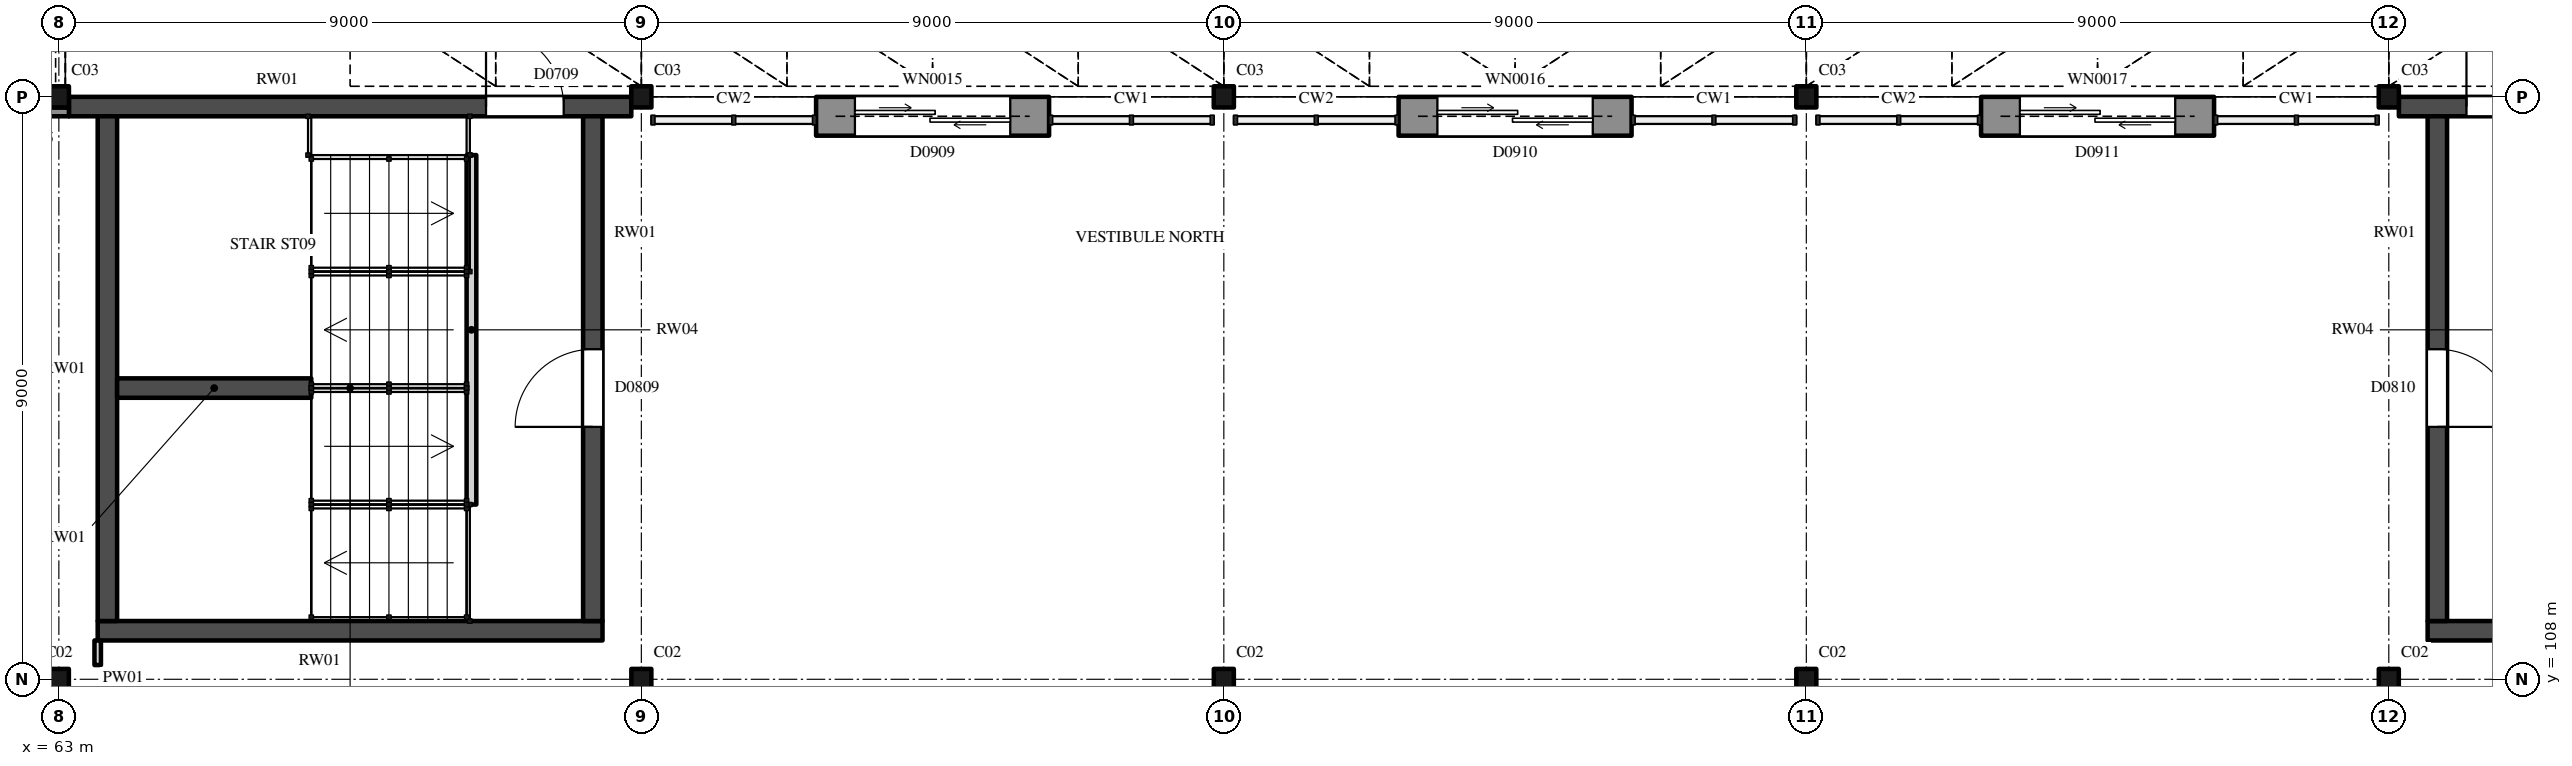
"""IFC4 building model, lengths in metres.
Left out: names, types, materials, properties, quantities, classifications, styles, units other than length and angle.
Written with IfcOpenShell. Run it as: python <this file> out.ifc"""

import sys

from ifc_helpers import new_model, si_unit, direction, frame, frame_2d, origin, origin_2d, place, context, subcontext, project, spatial, rectangle, i_section, extrude, element, fill, save


model = new_model("IFC4")
c1 = context("Model", 3, precision=1e-05, world=origin(), true_north=direction((0.0, 1.0)))
c2 = subcontext(c1, "Body", "Model", "MODEL_VIEW")
j1 = project(units=[si_unit("LENGTHUNIT", "METRE"), si_unit("PLANEANGLEUNIT", "RADIAN")], contexts=[c1])
p1 = place(None, origin())
s1 = spatial("IfcSite", under=j1, at=p1, CompositionType="ELEMENT")
p2 = place(p1, origin())
s2 = spatial("IfcBuilding", under=s1, at=p2, CompositionType="ELEMENT")
p3 = place(p2, origin())
s3 = spatial("IfcBuildingStorey", under=s2, at=p3, CompositionType="ELEMENT", Elevation=0.0)
for number, where, z_axis, x_axis in (
    (1, (63.0, 108.0, 0.0), (0.0, 0.0, 1.0), (1.0, 0.0, 0.0)),
    (2, (72.0, 108.0, 0.0), (0.0, 0.0, 1.0), (1.0, 0.0, 0.0)),
    (3, (81.0, 108.0, 0.0), (0.0, 0.0, 1.0), (1.0, 0.0, 0.0)),
    (4, (90.0, 108.0, 0.0), (0.0, 0.0, 1.0), (1.0, 0.0, 0.0)),
    (5, (99.0, 108.0, 0.0), (0.0, 0.0, 1.0), (1.0, 0.0, 0.0)),
):
    element("IfcColumn", number, at=place(p3, frame(where, z_axis=z_axis, x_axis=x_axis)), inside=s3, PredefinedType="COLUMN", context=c2, shape_type="SweptSolid", body=[
        extrude(i_section(OverallWidth=0.309, OverallDepth=0.321, WebThickness=0.014, FlangeThickness=0.022, FilletRadius=0.017, at=origin_2d()), origin(), (0.0, 0.0, 1.0), 6.0),
    ])
for number, where, z_axis, x_axis in (
    (6, (63.0, 117.0, 0.0), (0.0, 0.0, 1.0), (1.0, 0.0, 0.0)),
    (7, (72.0, 117.0, 0.0), (0.0, 0.0, 1.0), (1.0, 0.0, 0.0)),
    (8, (81.0, 117.0, 0.0), (0.0, 0.0, 1.0), (1.0, 0.0, 0.0)),
    (9, (90.0, 117.0, 0.0), (0.0, 0.0, 1.0), (1.0, 0.0, 0.0)),
    (10, (99.0, 117.0, 0.0), (0.0, 0.0, 1.0), (1.0, 0.0, 0.0)),
):
    element("IfcColumn", number, at=place(p3, frame(where, z_axis=z_axis, x_axis=x_axis)), inside=s3, PredefinedType="COLUMN", context=c2, shape_type="SweptSolid", body=[
        extrude(i_section(OverallWidth=0.311, OverallDepth=0.327, WebThickness=0.016, FlangeThickness=0.025, FilletRadius=0.017, at=origin_2d()), origin(), (0.0, 0.0, 1.0), 6.0),
    ])
p4 = place(p3, frame((63.025, 117.0, 5.0), z_axis=(0.0, 0.0, 1.0), x_axis=(0.0, 1.0, 0.0)))
e11 = element("IfcWall", 11, at=p4, inside=s3, PredefinedType="PARAPET", context=c2, shape_type="SweptSolid", body=[
    extrude(rectangle(XDim=4.35, YDim=0.15, at=frame_2d((2.175, 0.0))), origin(), (0.0, 0.0, 1.0), 0.3),
])
p5 = place(p3, frame((63.6, 108.75, 0.0), z_axis=(0.0, 0.0, 1.0), x_axis=(1.0, 0.0, 0.0)))
e12 = element("IfcWall", 12, at=p5, inside=s3, PredefinedType="SHEAR", context=c2, shape_type="SweptSolid", body=[
    extrude(rectangle(XDim=7.8, YDim=0.3, at=frame_2d((3.9, 0.0))), origin(), (0.0, 0.0, 1.0), 6.0),
])
p6 = place(p3, frame((63.156, 116.85, 0.0), z_axis=(0.0, 0.0, 1.0), x_axis=(1.0, 0.0, 0.0)))
e13 = element("IfcWall", 13, at=p6, inside=s3, PredefinedType="SHEAR", context=c2, shape_type="SweptSolid", body=[
    extrude(rectangle(XDim=8.689, YDim=0.3, at=frame_2d((4.344, 0.0))), origin(), (0.0, 0.0, 1.0), 6.0),
])
p7 = place(p6, frame((6.445, 0.0, 0.0)))
e14 = element("IfcOpeningElement", 14, at=p7, cuts=e13, PredefinedType="OPENING", context=c2, shape_type="SweptSolid", body=[
    extrude(rectangle(XDim=1.2, YDim=2.1, at=frame_2d((0.6, 1.05))), frame((0.0, 0.16, 0.0), z_axis=(0.0, -1.0, 0.0), x_axis=(1.0, 0.0, 0.0)), (0.0, 0.0, 1.0), 0.32),
])
p8 = place(p3, frame((63.75, 108.9, 0.0), z_axis=(0.0, 0.0, 1.0), x_axis=(0.0, 1.0, 0.0)))
e15 = element("IfcWall", 15, at=p8, inside=s3, PredefinedType="SHEAR", context=c2, shape_type="SweptSolid", body=[
    extrude(rectangle(XDim=7.8, YDim=0.3, at=frame_2d((3.9, 0.0))), origin(), (0.0, 0.0, 1.0), 6.0),
])
p9 = place(p3, frame((71.25, 108.9, 0.0), z_axis=(0.0, 0.0, 1.0), x_axis=(0.0, 1.0, 0.0)))
e16 = element("IfcWall", 16, at=p9, inside=s3, PredefinedType="SHEAR", context=c2, shape_type="SweptSolid", body=[
    extrude(rectangle(XDim=7.8, YDim=0.3, at=frame_2d((3.9, 0.0))), origin(), (0.0, 0.0, 1.0), 6.0),
])
p10 = place(p9, frame((3.0, 0.0, 0.0)))
e17 = element("IfcOpeningElement", 17, at=p10, cuts=e16, PredefinedType="OPENING", context=c2, shape_type="SweptSolid", body=[
    extrude(rectangle(XDim=1.2, YDim=2.1, at=frame_2d((0.6, 1.05))), frame((0.0, 0.16, 0.0), z_axis=(0.0, -1.0, 0.0), x_axis=(1.0, 0.0, 0.0)), (0.0, 0.0, 1.0), 0.32),
])
p11 = place(p3, frame((99.6, 108.75, 0.0), z_axis=(0.0, 0.0, 1.0), x_axis=(1.0, 0.0, 0.0)))
e18 = element("IfcWall", 18, at=p11, inside=s3, PredefinedType="SHEAR", context=c2, shape_type="SweptSolid", body=[
    extrude(rectangle(XDim=7.8, YDim=0.3, at=frame_2d((3.9, 0.0))), origin(), (0.0, 0.0, 1.0), 6.0),
])
p12 = place(p3, frame((99.156, 116.85, 0.0), z_axis=(0.0, 0.0, 1.0), x_axis=(1.0, 0.0, 0.0)))
e19 = element("IfcWall", 19, at=p12, inside=s3, PredefinedType="SHEAR", context=c2, shape_type="SweptSolid", body=[
    extrude(rectangle(XDim=8.689, YDim=0.3, at=frame_2d((4.344, 0.0))), origin(), (0.0, 0.0, 1.0), 6.0),
])
p13 = place(p12, frame((1.044, 0.0, 0.0)))
e20 = element("IfcOpeningElement", 20, at=p13, cuts=e19, PredefinedType="OPENING", context=c2, shape_type="SweptSolid", body=[
    extrude(rectangle(XDim=1.2, YDim=2.1, at=frame_2d((0.6, 1.05))), frame((0.0, 0.16, 0.0), z_axis=(0.0, -1.0, 0.0), x_axis=(1.0, 0.0, 0.0)), (0.0, 0.0, 1.0), 0.32),
])
p14 = place(p3, frame((99.75, 108.9, 0.0), z_axis=(0.0, 0.0, 1.0), x_axis=(0.0, 1.0, 0.0)))
e21 = element("IfcWall", 21, at=p14, inside=s3, PredefinedType="SHEAR", context=c2, shape_type="SweptSolid", body=[
    extrude(rectangle(XDim=7.8, YDim=0.3, at=frame_2d((3.9, 0.0))), origin(), (0.0, 0.0, 1.0), 6.0),
])
p15 = place(p14, frame((3.0, 0.0, 0.0)))
e22 = element("IfcOpeningElement", 22, at=p15, cuts=e21, PredefinedType="OPENING", context=c2, shape_type="SweptSolid", body=[
    extrude(rectangle(XDim=1.2, YDim=2.1, at=frame_2d((0.6, 1.05))), frame((0.0, 0.16, 0.0), z_axis=(0.0, -1.0, 0.0), x_axis=(1.0, 0.0, 0.0)), (0.0, 0.0, 1.0), 0.32),
])
p16 = place(p3, frame((66.9, 112.5, 0.0), z_axis=(0.0, 0.0, 1.0), x_axis=(-1.0, 0.0, 0.0)))
e23 = element("IfcWall", 23, at=p16, inside=s3, PredefinedType="SHEAR", context=c2, shape_type="SweptSolid", body=[
    extrude(rectangle(XDim=3.0, YDim=0.3, at=frame_2d((1.5, 0.0))), origin(), (0.0, 0.0, 1.0), 6.0),
])
p17 = place(p3, frame((69.375, 110.7, 0.0), z_axis=(0.0, 0.0, 1.0), x_axis=(0.0, 1.0, 0.0)))
e24 = element("IfcWall", 24, at=p17, inside=s3, PredefinedType="STANDARD", context=c2, shape_type="SweptSolid", body=[
    extrude(rectangle(XDim=5.4, YDim=0.15, at=frame_2d((2.7, 0.0))), origin(), (0.0, 0.0, 1.0), 2.8),
])
p18 = place(p3, frame((74.7, 116.7, 0.0), z_axis=(0.0, 0.0, 1.0), x_axis=(1.0, 0.0, 0.0)))
e25 = element("IfcWall", 25, at=p18, inside=s3, PredefinedType="SOLIDWALL", context=c2, shape_type="SweptSolid", body=[
    extrude(rectangle(XDim=3.6, YDim=0.6, at=frame_2d((1.8, 0.0))), origin(), (0.0, 0.0, 1.0), 5.466),
])
p19 = place(p18, frame((0.6, 0.0, 0.0)))
e26 = element("IfcOpeningElement", 26, at=p19, cuts=e25, PredefinedType="OPENING", context=c2, shape_type="SweptSolid", body=[
    extrude(rectangle(XDim=2.4, YDim=2.5, at=frame_2d((1.2, 1.25))), frame((0.0, 0.31, 0.0), z_axis=(0.0, -1.0, 0.0), x_axis=(1.0, 0.0, 0.0)), (0.0, 0.0, 1.0), 0.62),
])
p20 = place(p18, frame((0.3, 0.0, 3.0)))
e27 = element("IfcOpeningElement", 27, at=p20, cuts=e25, PredefinedType="OPENING", context=c2, shape_type="SweptSolid", body=[
    extrude(rectangle(XDim=3.0, YDim=2.4, at=frame_2d((1.5, 1.2))), frame((0.0, 0.31, 0.0), z_axis=(0.0, -1.0, 0.0), x_axis=(1.0, 0.0, 0.0)), (0.0, 0.0, 1.0), 0.62),
])
p21 = place(p3, frame((83.7, 116.7, 0.0), z_axis=(0.0, 0.0, 1.0), x_axis=(1.0, 0.0, 0.0)))
e28 = element("IfcWall", 28, at=p21, inside=s3, PredefinedType="SOLIDWALL", context=c2, shape_type="SweptSolid", body=[
    extrude(rectangle(XDim=3.6, YDim=0.6, at=frame_2d((1.8, 0.0))), origin(), (0.0, 0.0, 1.0), 5.466),
])
p22 = place(p21, frame((0.6, 0.0, 0.0)))
e29 = element("IfcOpeningElement", 29, at=p22, cuts=e28, PredefinedType="OPENING", context=c2, shape_type="SweptSolid", body=[
    extrude(rectangle(XDim=2.4, YDim=2.5, at=frame_2d((1.2, 1.25))), frame((0.0, 0.31, 0.0), z_axis=(0.0, -1.0, 0.0), x_axis=(1.0, 0.0, 0.0)), (0.0, 0.0, 1.0), 0.62),
])
p23 = place(p21, frame((0.3, 0.0, 3.0)))
e30 = element("IfcOpeningElement", 30, at=p23, cuts=e28, PredefinedType="OPENING", context=c2, shape_type="SweptSolid", body=[
    extrude(rectangle(XDim=3.0, YDim=2.4, at=frame_2d((1.5, 1.2))), frame((0.0, 0.31, 0.0), z_axis=(0.0, -1.0, 0.0), x_axis=(1.0, 0.0, 0.0)), (0.0, 0.0, 1.0), 0.62),
])
p24 = place(p3, frame((92.7, 116.7, 0.0), z_axis=(0.0, 0.0, 1.0), x_axis=(1.0, 0.0, 0.0)))
e31 = element("IfcWall", 31, at=p24, inside=s3, PredefinedType="SOLIDWALL", context=c2, shape_type="SweptSolid", body=[
    extrude(rectangle(XDim=3.6, YDim=0.6, at=frame_2d((1.8, 0.0))), origin(), (0.0, 0.0, 1.0), 5.466),
])
p25 = place(p24, frame((0.6, 0.0, 0.0)))
e32 = element("IfcOpeningElement", 32, at=p25, cuts=e31, PredefinedType="OPENING", context=c2, shape_type="SweptSolid", body=[
    extrude(rectangle(XDim=2.4, YDim=2.5, at=frame_2d((1.2, 1.25))), frame((0.0, 0.31, 0.0), z_axis=(0.0, -1.0, 0.0), x_axis=(1.0, 0.0, 0.0)), (0.0, 0.0, 1.0), 0.62),
])
p26 = place(p24, frame((0.3, 0.0, 3.0)))
e33 = element("IfcOpeningElement", 33, at=p26, cuts=e31, PredefinedType="OPENING", context=c2, shape_type="SweptSolid", body=[
    extrude(rectangle(XDim=3.0, YDim=2.4, at=frame_2d((1.5, 1.2))), frame((0.0, 0.31, 0.0), z_axis=(0.0, -1.0, 0.0), x_axis=(1.0, 0.0, 0.0)), (0.0, 0.0, 1.0), 0.62),
])
p27 = place(p3, frame((62.833, 116.768, 0.0), z_axis=(0.0, 0.0, 1.0), x_axis=(1.0, 0.0, 0.0)))
e34 = element("IfcWall", 34, at=p27, inside=s3, PredefinedType="SOLIDWALL", context=c2, shape_type="SweptSolid", body=[
    extrude(rectangle(XDim=0.322, YDim=0.136, at=frame_2d((0.161, 0.0))), origin(), (0.0, 0.0, 1.0), 6.0),
])
p28 = place(p3, frame((63.6, 108.22, 0.0), z_axis=(0.0, 0.0, 1.0), x_axis=(0.0, 1.0, 0.0)))
e35 = element("IfcWall", 35, at=p28, inside=s3, PredefinedType="PARTITIONING", context=c2, shape_type="SweptSolid", body=[
    extrude(rectangle(XDim=0.38, YDim=0.1, at=frame_2d((0.19, 0.0))), origin(), (0.0, 0.0, 1.0), 5.825),
])
p29 = place(p10, origin())
e36 = element("IfcDoor", 36, at=p29, inside=s3, OperationType="SINGLE_SWING_RIGHT", PredefinedType="DOOR", context=c2, shape_type="SweptSolid", body=[
    extrude(rectangle(XDim=1.2, YDim=2.1, at=frame_2d((0.6, 1.05))), frame((0.0, 0.025, 0.0), z_axis=(0.0, -1.0, 0.0), x_axis=(1.0, 0.0, 0.0)), (0.0, 0.0, 1.0), 0.05),
])
fill(e17, e36)
p30 = place(p7, origin())
e37 = element("IfcDoor", 37, at=p30, inside=s3, OperationType="SINGLE_SWING_RIGHT", PredefinedType="DOOR", context=c2, shape_type="SweptSolid", body=[
    extrude(rectangle(XDim=1.2, YDim=2.1, at=frame_2d((0.6, 1.05))), frame((0.0, 0.025, 0.0), z_axis=(0.0, -1.0, 0.0), x_axis=(1.0, 0.0, 0.0)), (0.0, 0.0, 1.0), 0.05),
])
fill(e14, e37)
p31 = place(p15, origin())
e38 = element("IfcDoor", 38, at=p31, inside=s3, OperationType="SINGLE_SWING_LEFT", PredefinedType="DOOR", context=c2, shape_type="SweptSolid", body=[
    extrude(rectangle(XDim=1.2, YDim=2.1, at=frame_2d((0.6, 1.05))), frame((0.0, 0.025, 0.0), z_axis=(0.0, -1.0, 0.0), x_axis=(1.0, 0.0, 0.0)), (0.0, 0.0, 1.0), 0.05),
])
fill(e22, e38)
p32 = place(p13, origin())
e39 = element("IfcDoor", 39, at=p32, inside=s3, OperationType="SINGLE_SWING_RIGHT", PredefinedType="DOOR", context=c2, shape_type="SweptSolid", body=[
    extrude(rectangle(XDim=1.2, YDim=2.1, at=frame_2d((0.6, 1.05))), frame((0.0, 0.025, 0.0), z_axis=(0.0, -1.0, 0.0), x_axis=(1.0, 0.0, 0.0)), (0.0, 0.0, 1.0), 0.05),
])
fill(e20, e39)
p33 = place(p19, origin())
e40 = element("IfcDoor", 40, at=p33, inside=s3, OperationType="DOUBLE_DOOR_SLIDING", PredefinedType="DOOR", context=c2, shape_type="SweptSolid", body=[
    extrude(rectangle(XDim=2.4, YDim=2.5, at=frame_2d((1.2, 1.25))), frame((0.0, 0.025, 0.0), z_axis=(0.0, -1.0, 0.0), x_axis=(1.0, 0.0, 0.0)), (0.0, 0.0, 1.0), 0.05),
])
fill(e26, e40)
p34 = place(p20, origin())
e41 = element("IfcWindow", 41, at=p34, inside=s3, PartitioningType="SINGLE_PANEL", PredefinedType="WINDOW", context=c2, shape_type="SweptSolid", body=[
    extrude(rectangle(XDim=3.0, YDim=2.4, at=frame_2d((1.5, 1.2))), frame((0.0, 0.03, 0.0), z_axis=(0.0, -1.0, 0.0), x_axis=(1.0, 0.0, 0.0)), (0.0, 0.0, 1.0), 0.06),
])
fill(e27, e41)
p35 = place(p22, origin())
e42 = element("IfcDoor", 42, at=p35, inside=s3, OperationType="DOUBLE_DOOR_SLIDING", PredefinedType="DOOR", context=c2, shape_type="SweptSolid", body=[
    extrude(rectangle(XDim=2.4, YDim=2.5, at=frame_2d((1.2, 1.25))), frame((0.0, 0.025, 0.0), z_axis=(0.0, -1.0, 0.0), x_axis=(1.0, 0.0, 0.0)), (0.0, 0.0, 1.0), 0.05),
])
fill(e29, e42)
p36 = place(p23, origin())
e43 = element("IfcWindow", 43, at=p36, inside=s3, PartitioningType="SINGLE_PANEL", PredefinedType="WINDOW", context=c2, shape_type="SweptSolid", body=[
    extrude(rectangle(XDim=3.0, YDim=2.4, at=frame_2d((1.5, 1.2))), frame((0.0, 0.03, 0.0), z_axis=(0.0, -1.0, 0.0), x_axis=(1.0, 0.0, 0.0)), (0.0, 0.0, 1.0), 0.06),
])
fill(e30, e43)
p37 = place(p25, origin())
e44 = element("IfcDoor", 44, at=p37, inside=s3, OperationType="DOUBLE_DOOR_SLIDING", PredefinedType="DOOR", context=c2, shape_type="SweptSolid", body=[
    extrude(rectangle(XDim=2.4, YDim=2.5, at=frame_2d((1.2, 1.25))), frame((0.0, 0.025, 0.0), z_axis=(0.0, -1.0, 0.0), x_axis=(1.0, 0.0, 0.0)), (0.0, 0.0, 1.0), 0.05),
])
fill(e32, e44)
p38 = place(p26, origin())
e45 = element("IfcWindow", 45, at=p38, inside=s3, PartitioningType="SINGLE_PANEL", PredefinedType="WINDOW", context=c2, shape_type="SweptSolid", body=[
    extrude(rectangle(XDim=3.0, YDim=2.4, at=frame_2d((1.5, 1.2))), frame((0.0, 0.03, 0.0), z_axis=(0.0, -1.0, 0.0), x_axis=(1.0, 0.0, 0.0)), (0.0, 0.0, 1.0), 0.06),
])
fill(e33, e45)
save(model, sys.argv[1])
